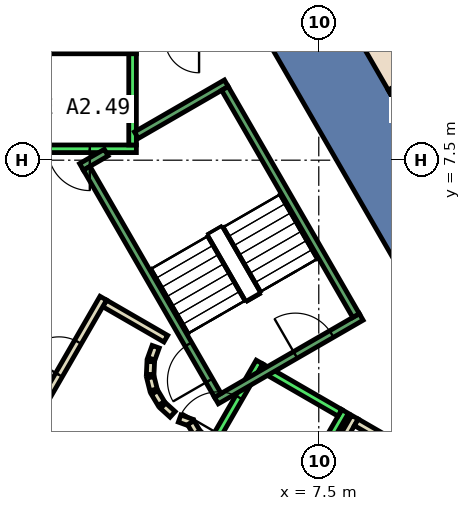
"""IFC4 building model, lengths in metres.
Left out: names, types, materials, properties, quantities, classifications, styles, units other than length and angle.
Written with IfcOpenShell. Run it as: python <this file> out.ifc"""

import sys

from ifc_helpers import new_model, si_unit, direction, frame, frame_2d, origin, place, context, subcontext, project, spatial, polyline, rectangle, outline, extrude, element, fill, save


model = new_model("IFC4")
c1 = context("Model", 3, precision=1e-05, world=origin(), true_north=direction((0.0, 1.0)))
c2 = subcontext(c1, "Body", "Model", "MODEL_VIEW")
j1 = project(units=[si_unit("LENGTHUNIT", "METRE"), si_unit("PLANEANGLEUNIT", "RADIAN")], contexts=[c1])
p1 = place(None, origin())
s1 = spatial("IfcSite", under=j1, at=p1, CompositionType="ELEMENT")
p2 = place(p1, origin())
s2 = spatial("IfcBuilding", under=s1, at=p2, CompositionType="ELEMENT")
p3 = place(p2, frame((0.0, 0.0, 236.0)))
s3 = spatial("IfcBuildingStorey", under=s2, at=p3, CompositionType="ELEMENT", Elevation=236.0)
p4 = place(p3, frame((0.0, 0.0, -0.6)))
e1 = element("IfcWall", 1, at=p4, inside=s3, PredefinedType="SHEAR", context=c2, shape_type="SweptSolid", body=[
    extrude(outline(polyline([(8.085, 11.498), (6.266, 10.447), (10.854, 2.5), (13.279, 2.5), (8.085, 11.498)])), origin(), (0.0, 0.0, 1.0), 5.4),
])
p5 = place(p3, frame((0.0, 0.0, -0.6)))
e2 = element("IfcWall", 2, at=p5, inside=s3, PredefinedType="SHEAR", context=c2, shape_type="SweptSolid", body=[
    extrude(outline(polyline([(6.64, -9.0), (13.279, 2.5), (10.854, 2.5), (5.427, -6.9), (6.64, -9.0)])), origin(), (0.0, 0.0, 1.0), 5.4),
])
p6 = place(p3, frame((7.051, -1.687, 0.0), z_axis=(0.0, 0.0, 1.0), x_axis=(0.49994636267, 0.866056369097, 0.0)))
e3 = element("IfcWall", 3, at=p6, inside=s3, PredefinedType="PARTITIONING", context=c2, shape_type="SweptSolid", body=[
    extrude(rectangle(XDim=2.8, YDim=0.2, at=frame_2d((1.4, 0.0))), origin(), (0.0, 0.0, 1.0), 4.8),
])
p7 = place(p3, frame((8.488, 0.602, 0.0), z_axis=(0.0, 0.0, 1.0), x_axis=(0.866063652425, -0.499933745558, 0.0)))
e4 = element("IfcWall", 4, at=p7, inside=s3, PredefinedType="PARTITIONING", context=c2, shape_type="SweptSolid", body=[
    extrude(rectangle(XDim=1.1, YDim=0.2, at=frame_2d((0.55, 0.0))), origin(), (0.0, 0.0, 1.0), 4.8),
])
p8 = place(p3, frame((1.866, 3.732, 0.0), z_axis=(0.0, 0.0, 1.0), x_axis=(0.866043361281, -0.499968895414, 0.0)))
e5 = element("IfcWall", 5, at=p8, inside=s3, PredefinedType="PARTITIONING", context=c2, shape_type="SweptSolid", body=[
    extrude(rectangle(XDim=1.858, YDim=0.2, at=frame_2d((0.929, 0.0))), origin(), (0.0, 0.0, 1.0), 4.8),
])
p9 = place(p3, frame((3.208, 2.592, 0.0), z_axis=(0.0, 0.0, 1.0), x_axis=(-0.337388820924, -0.941365382578, 0.0)))
e6 = element("IfcWall", 6, at=p9, inside=s3, PredefinedType="PARTITIONING", context=c2, shape_type="SweptSolid", body=[
    extrude(rectangle(XDim=0.338, YDim=0.2, at=frame_2d((0.169, 0.0))), origin(), (0.0, 0.0, 1.0), 4.8),
])
p10 = place(p3, frame((3.079, 2.199, 0.0), z_axis=(0.0, 0.0, 1.0), x_axis=(-0.047771483479, -0.998858290933, 0.0)))
e7 = element("IfcWall", 7, at=p10, inside=s3, PredefinedType="PARTITIONING", context=c2, shape_type="SweptSolid", body=[
    extrude(rectangle(XDim=0.337, YDim=0.2, at=frame_2d((0.169, 0.0))), origin(), (0.0, 0.0, 1.0), 4.8),
])
p11 = place(p3, frame((3.07, 1.786, 0.0), z_axis=(0.0, 0.0, 1.0), x_axis=(0.242705583207, -0.970099994784, 0.0)))
e8 = element("IfcWall", 8, at=p11, inside=s3, PredefinedType="PARTITIONING", context=c2, shape_type="SweptSolid", body=[
    extrude(rectangle(XDim=0.338, YDim=0.2, at=frame_2d((0.169, 0.0))), origin(), (0.0, 0.0, 1.0), 4.8),
])
for number, where, z_axis, x_axis in (
    (9, (3.182, 1.388, 0.0), (0.0, 0.0, 1.0), (0.512, -0.859, 0.0)),
    (10, (3.404, 1.039, 0.0), (0.0, 0.0, 1.0), (0.74, -0.672, 0.0)),
):
    element("IfcWall", number, at=place(p3, frame(where, z_axis=z_axis, x_axis=x_axis)), inside=s3, PredefinedType="PARTITIONING", context=c2, shape_type="SweptSolid", body=[
        extrude(rectangle(XDim=0.338, YDim=0.2, at=frame_2d((0.169, 0.0))), origin(), (0.0, 0.0, 1.0), 4.8),
    ])
p12 = place(p3, frame((3.838, 0.702, 0.0), z_axis=(0.0, 0.0, 1.0), x_axis=(0.941035081519, -0.338308993895, 0.0)))
e11 = element("IfcWall", 11, at=p12, inside=s3, PredefinedType="PARTITIONING", context=c2, shape_type="SweptSolid", body=[
    extrude(rectangle(XDim=0.337, YDim=0.2, at=frame_2d((0.168, 0.0))), origin(), (0.0, 0.0, 1.0), 4.8),
])
p13 = place(p3, frame((4.132, 0.593, 0.0), z_axis=(0.0, 0.0, 1.0), x_axis=(0.513561617048, -0.858052717201, 0.0)))
e12 = element("IfcWall", 12, at=p13, inside=s3, PredefinedType="PARTITIONING", context=c2, shape_type="SweptSolid", body=[
    extrude(rectangle(XDim=0.308, YDim=0.2, at=frame_2d((0.154, 0.0))), origin(), (0.0, 0.0, 1.0), 4.8),
])
p14 = place(p3, frame((4.301, 0.315, 0.0), z_axis=(0.0, 0.0, 1.0), x_axis=(0.741798017506, -0.670623367639, 0.0)))
e13 = element("IfcWall", 13, at=p14, inside=s3, PredefinedType="PARTITIONING", context=c2, shape_type="SweptSolid", body=[
    extrude(rectangle(XDim=0.309, YDim=0.2, at=frame_2d((0.154, 0.0))), origin(), (0.0, 0.0, 1.0), 4.8),
])
p15 = place(p3, frame((0.05, 0.787, 0.0), z_axis=(0.0, 0.0, 1.0), x_axis=(0.499954076797, 0.866051915934, 0.0)))
e14 = element("IfcWall", 14, at=p15, inside=s3, PredefinedType="PARTITIONING", context=c2, shape_type="SweptSolid", body=[
    extrude(rectangle(XDim=3.558, YDim=0.2, at=frame_2d((1.779, 0.0))), origin(), (0.0, 0.0, 1.0), 4.8),
])
p16 = place(p15, frame((1.229, 0.0, 0.0)))
e15 = element("IfcOpeningElement", 15, at=p16, cuts=e14, PredefinedType="OPENING", context=c2, shape_type="SweptSolid", body=[
    extrude(rectangle(XDim=1.0, YDim=2.1, at=frame_2d((0.5, 1.05))), frame((0.0, 0.11, 0.0), z_axis=(0.0, -1.0, 0.0), x_axis=(1.0, 0.0, 0.0)), (0.0, 0.0, 1.0), 0.22),
])
p17 = place(p3, frame((11.455, 10.459, 0.0), z_axis=(0.0, 0.0, 1.0), x_axis=(-0.865999212041, -0.500045362686, 0.0)))
e16 = element("IfcWall", 16, at=p17, inside=s3, PredefinedType="PARTITIONING", context=c2, shape_type="SweptSolid", body=[
    extrude(rectangle(XDim=2.4, YDim=0.2, at=frame_2d((1.2, 0.0))), origin(), (0.0, 0.0, 1.0), 2.4),
])
p18 = place(p17, frame((0.6, 0.0, 0.0)))
e17 = element("IfcOpeningElement", 17, at=p18, cuts=e16, PredefinedType="OPENING", context=c2, shape_type="SweptSolid", body=[
    extrude(rectangle(XDim=1.0, YDim=2.1, at=frame_2d((0.5, 1.05))), frame((0.0, 0.11, 0.0), z_axis=(0.0, -1.0, 0.0), x_axis=(1.0, 0.0, 0.0)), (0.0, 0.0, 1.0), 0.22),
])
p19 = place(p3, frame((7.905, 16.608, 0.0), z_axis=(0.0, 0.0, 1.0), x_axis=(0.499957262057, -0.866050077142, 0.0)))
e18 = element("IfcWall", 18, at=p19, inside=s3, PredefinedType="PARTITIONING", context=c2, shape_type="SweptSolid", body=[
    extrude(rectangle(XDim=7.2, YDim=0.2, at=frame_2d((3.6, 0.0))), origin(), (0.0, 0.0, 1.0), 4.8),
])
p20 = place(p19, frame((2.512, 0.0, 0.0)))
e19 = element("IfcOpeningElement", 19, at=p20, cuts=e18, PredefinedType="OPENING", context=c2, shape_type="SweptSolid", body=[
    extrude(rectangle(XDim=1.0, YDim=2.1, at=frame_2d((0.5, 1.05))), frame((0.0, 0.11, 0.0), z_axis=(0.0, -1.0, 0.0), x_axis=(1.0, 0.0, 0.0)), (0.0, 0.0, 1.0), 0.22),
])
p21 = place(p3, frame((2.7, 7.8, 0.0), z_axis=(0.0, 0.0, 1.0), x_axis=(-1.0, 0.0, 0.0)))
e20 = element("IfcWall", 20, at=p21, inside=s3, PredefinedType="STANDARD", context=c2, shape_type="SweptSolid", body=[
    extrude(rectangle(XDim=5.4, YDim=0.2, at=frame_2d((2.7, 0.0))), origin(), (0.0, 0.0, 1.0), 4.8),
])
p22 = place(p21, frame((1.225, 0.0, 0.0)))
e21 = element("IfcOpeningElement", 21, at=p22, cuts=e20, PredefinedType="OPENING", context=c2, shape_type="SweptSolid", body=[
    extrude(rectangle(XDim=1.1, YDim=2.1, at=frame_2d((0.55, 1.05))), frame((0.0, 0.11, 0.0), z_axis=(0.0, -1.0, 0.0), x_axis=(1.0, 0.0, 0.0)), (0.0, 0.0, 1.0), 0.22),
])
p23 = place(p21, frame((3.075, 0.0, 0.0)))
e22 = element("IfcOpeningElement", 22, at=p23, cuts=e20, PredefinedType="OPENING", context=c2, shape_type="SweptSolid", body=[
    extrude(rectangle(XDim=1.1, YDim=2.1, at=frame_2d((0.55, 1.05))), frame((0.0, 0.11, 0.0), z_axis=(0.0, -1.0, 0.0), x_axis=(1.0, 0.0, 0.0)), (0.0, 0.0, 1.0), 0.22),
])
p24 = place(p3, frame((2.7, 10.4, 0.0), z_axis=(0.0, 0.0, 1.0), x_axis=(-1.0, 0.0, 0.0)))
e23 = element("IfcWall", 23, at=p24, inside=s3, PredefinedType="STANDARD", context=c2, shape_type="SweptSolid", body=[
    extrude(rectangle(XDim=5.4, YDim=0.2, at=frame_2d((2.7, 0.0))), origin(), (0.0, 0.0, 1.0), 4.8),
])
p25 = place(p3, frame((2.6, 7.9, 0.0), z_axis=(0.0, 0.0, 1.0), x_axis=(0.0, 1.0, 0.0)))
e24 = element("IfcWall", 24, at=p25, inside=s3, PredefinedType="STANDARD", context=c2, shape_type="SweptSolid", body=[
    extrude(rectangle(XDim=2.4, YDim=0.2, at=frame_2d((1.2, 0.0))), origin(), (0.0, 0.0, 1.0), 4.8),
])
p26 = place(p3, frame((3.24, -2.488, 0.0), z_axis=(0.0, 0.0, 1.0), x_axis=(0.500034260056, 0.866005622828, 0.0)))
e25 = element("IfcWall", 25, at=p26, inside=s3, PredefinedType="STANDARD", context=c2, shape_type="SweptSolid", body=[
    extrude(rectangle(XDim=5.399, YDim=0.2, at=frame_2d((2.7, 0.0))), origin(), (0.0, 0.0, 1.0), 4.8),
])
p27 = place(p26, frame((3.225, 0.0, 0.0)))
e26 = element("IfcOpeningElement", 26, at=p27, cuts=e25, PredefinedType="OPENING", context=c2, shape_type="SweptSolid", body=[
    extrude(rectangle(XDim=1.1, YDim=2.1, at=frame_2d((0.55, 1.05))), frame((0.0, 0.11, 0.0), z_axis=(0.0, -1.0, 0.0), x_axis=(1.0, 0.0, 0.0)), (0.0, 0.0, 1.0), 0.22),
])
p28 = place(p26, frame((1.225, 0.0, 0.0)))
e27 = element("IfcOpeningElement", 27, at=p28, cuts=e25, PredefinedType="OPENING", context=c2, shape_type="SweptSolid", body=[
    extrude(rectangle(XDim=1.1, YDim=2.1, at=frame_2d((0.55, 1.05))), frame((0.0, 0.11, 0.0), z_axis=(0.0, -1.0, 0.0), x_axis=(1.0, 0.0, 0.0)), (0.0, 0.0, 1.0), 0.22),
])
p29 = place(p3, frame((5.492, -3.788, 0.0), z_axis=(0.0, 0.0, 1.0), x_axis=(0.500034260056, 0.866005622828, 0.0)))
e28 = element("IfcWall", 28, at=p29, inside=s3, PredefinedType="STANDARD", context=c2, shape_type="SweptSolid", body=[
    extrude(rectangle(XDim=5.399, YDim=0.2, at=frame_2d((2.7, 0.0))), origin(), (0.0, 0.0, 1.0), 4.8),
])
p30 = place(p3, frame((5.977, 2.052, 0.0), z_axis=(0.0, 0.0, 1.0), x_axis=(0.865973769406, -0.500089422704, 0.0)))
e29 = element("IfcWall", 29, at=p30, inside=s3, PredefinedType="STANDARD", context=c2, shape_type="SweptSolid", body=[
    extrude(rectangle(XDim=2.399, YDim=0.2, at=frame_2d((1.2, 0.0))), origin(), (0.0, 0.0, 1.0), 4.8),
])
p31 = place(p3, frame((4.806, 1.176, 0.0), z_axis=(0.0, 0.0, 1.0), x_axis=(0.866059941101, 0.499940174841, 0.0)))
e30 = element("IfcWall", 30, at=p31, inside=s3, PredefinedType="STANDARD", context=c2, shape_type="SweptSolid", body=[
    extrude(rectangle(XDim=4.4, YDim=0.2, at=frame_2d((2.2, 0.0))), origin(), (0.0, 0.0, 1.0), 4.8),
])
p32 = place(p31, frame((2.4, 0.0, 0.0)))
e31 = element("IfcOpeningElement", 31, at=p32, cuts=e30, PredefinedType="OPENING", context=c2, shape_type="SweptSolid", body=[
    extrude(rectangle(XDim=1.1, YDim=2.2, at=frame_2d((0.55, 1.1))), frame((0.0, 0.11, 0.0), z_axis=(0.0, -1.0, 0.0), x_axis=(1.0, 0.0, 0.0)), (0.0, 0.0, 1.0), 0.22),
])
p33 = place(p3, frame((2.7, 8.158, 0.0), z_axis=(0.0, 0.0, 1.0), x_axis=(0.86611865017, 0.499838457731, 0.0)))
e32 = element("IfcWall", 32, at=p33, inside=s3, PredefinedType="STANDARD", context=c2, shape_type="SweptSolid", body=[
    extrude(rectangle(XDim=2.733, YDim=0.2, at=frame_2d((1.366, 0.0))), origin(), (0.0, 0.0, 1.0), 4.8),
])
p34 = place(p3, frame((1.256, 7.324, 0.0), z_axis=(0.0, 0.0, 1.0), x_axis=(0.865915093549, 0.500191014278, 0.0)))
e33 = element("IfcWall", 33, at=p34, inside=s3, PredefinedType="STANDARD", context=c2, shape_type="SweptSolid", body=[
    extrude(rectangle(XDim=0.752, YDim=0.2, at=frame_2d((0.376, 0.0))), origin(), (0.0, 0.0, 1.0), 4.8),
])
p35 = place(p3, frame((4.843, 1.312, 0.0), z_axis=(0.0, 0.0, 1.0), x_axis=(-0.499963383562, 0.866046543262, 0.0)))
e34 = element("IfcWall", 34, at=p35, inside=s3, PredefinedType="STANDARD", context=c2, shape_type="SweptSolid", body=[
    extrude(rectangle(XDim=6.9, YDim=0.2, at=frame_2d((3.45, 0.0))), origin(), (0.0, 0.0, 1.0), 4.8),
])
p36 = place(p35, frame((0.45, 0.0, 0.0)))
e35 = element("IfcOpeningElement", 35, at=p36, cuts=e34, PredefinedType="OPENING", context=c2, shape_type="SweptSolid", body=[
    extrude(rectangle(XDim=1.1, YDim=2.2, at=frame_2d((0.55, 1.1))), frame((0.0, 0.11, 0.0), z_axis=(0.0, -1.0, 0.0), x_axis=(1.0, 0.0, 0.0)), (0.0, 0.0, 1.0), 0.22),
])
p37 = place(p3, frame((8.48, 3.412, 0.0), z_axis=(0.0, 0.0, 1.0), x_axis=(-0.499978703459, 0.866037698999, 0.0)))
e36 = element("IfcWall", 36, at=p37, inside=s3, PredefinedType="STANDARD", context=c2, shape_type="SweptSolid", body=[
    extrude(rectangle(XDim=6.9, YDim=0.2, at=frame_2d((3.45, 0.0))), origin(), (0.0, 0.0, 1.0), 4.8),
])
p38 = place(p16, origin())
e37 = element("IfcDoor", 37, at=p38, inside=s3, OperationType="SINGLE_SWING_RIGHT", PredefinedType="DOOR", context=c2, shape_type="SweptSolid", body=[
    extrude(rectangle(XDim=1.0, YDim=2.1, at=frame_2d((0.5, 1.05))), frame((0.0, 0.025, 0.0), z_axis=(0.0, -1.0, 0.0), x_axis=(1.0, 0.0, 0.0)), (0.0, 0.0, 1.0), 0.05),
])
fill(e15, e37)
p39 = place(p22, origin())
e38 = element("IfcDoor", 38, at=p39, inside=s3, OperationType="SLIDING_TO_LEFT", PredefinedType="DOOR", context=c2, shape_type="SweptSolid", body=[
    extrude(rectangle(XDim=1.1, YDim=2.1, at=frame_2d((0.55, 1.05))), frame((0.0, 0.025, 0.0), z_axis=(0.0, -1.0, 0.0), x_axis=(1.0, 0.0, 0.0)), (0.0, 0.0, 1.0), 0.05),
])
fill(e21, e38)
p40 = place(p27, origin())
e39 = element("IfcDoor", 39, at=p40, inside=s3, OperationType="SLIDING_TO_LEFT", PredefinedType="DOOR", context=c2, shape_type="SweptSolid", body=[
    extrude(rectangle(XDim=1.1, YDim=2.1, at=frame_2d((0.55, 1.05))), frame((0.0, 0.025, 0.0), z_axis=(0.0, -1.0, 0.0), x_axis=(1.0, 0.0, 0.0)), (0.0, 0.0, 1.0), 0.05),
])
fill(e26, e39)
p41 = place(p36, origin())
e40 = element("IfcDoor", 40, at=p41, inside=s3, OperationType="SINGLE_SWING_LEFT", PredefinedType="DOOR", context=c2, shape_type="SweptSolid", body=[
    extrude(rectangle(XDim=1.1, YDim=2.2, at=frame_2d((0.55, 1.1))), frame((0.0, 0.025, 0.0), z_axis=(0.0, -1.0, 0.0), x_axis=(1.0, 0.0, 0.0)), (0.0, 0.0, 1.0), 0.05),
])
fill(e35, e40)
p42 = place(p32, origin())
e41 = element("IfcDoor", 41, at=p42, inside=s3, OperationType="SINGLE_SWING_LEFT", PredefinedType="DOOR", context=c2, shape_type="SweptSolid", body=[
    extrude(rectangle(XDim=1.1, YDim=2.2, at=frame_2d((0.55, 1.1))), frame((0.0, 0.025, 0.0), z_axis=(0.0, -1.0, 0.0), x_axis=(1.0, 0.0, 0.0)), (0.0, 0.0, 1.0), 0.05),
])
fill(e31, e41)
save(model, sys.argv[1])
